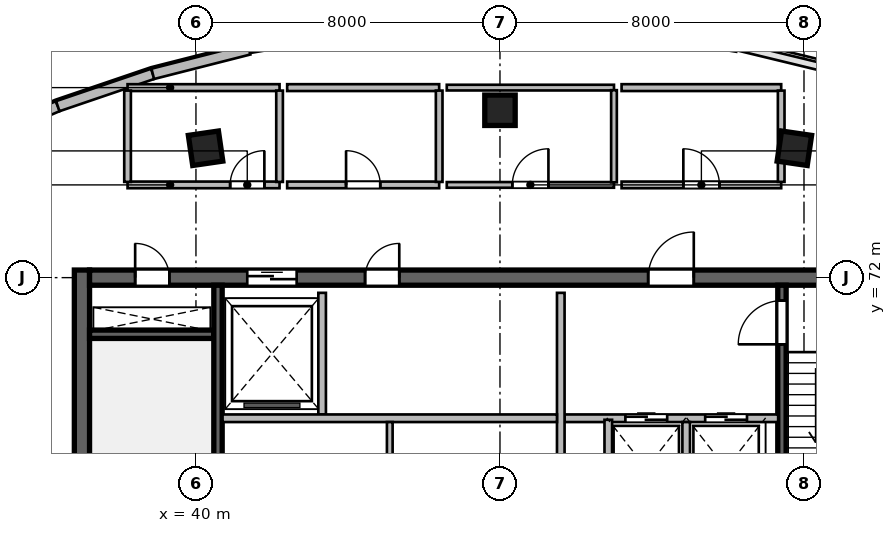
"""IFC4 building model, lengths in metres.
Left out: names, types, materials, properties, quantities, classifications, styles, units other than length and angle.
Written with IfcOpenShell. Run it as: python <this file> out.ifc"""

import sys

from ifc_helpers import new_model, si_unit, direction, frame, frame_2d, origin, origin_2d, place, context, subcontext, project, spatial, rectangle, extrude, source, transform, mapped, element, fill, save


model = new_model("IFC4")
c1 = context("Model", 3, precision=1e-05, world=origin(), true_north=direction((0.0, 1.0)))
c2 = subcontext(c1, "Body", "Model", "MODEL_VIEW")
j1 = project(units=[si_unit("LENGTHUNIT", "METRE"), si_unit("PLANEANGLEUNIT", "RADIAN")], contexts=[c1])
p1 = place(None, origin())
s1 = spatial("IfcSite", under=j1, at=p1, CompositionType="ELEMENT")
p2 = place(p1, origin())
s2 = spatial("IfcBuilding", under=s1, at=p2, CompositionType="ELEMENT")
p3 = place(p2, frame((0.0, 0.0, 279.6)))
s3 = spatial("IfcBuildingStorey", under=s2, at=p3, CompositionType="ELEMENT", Elevation=279.6)
m1 = source(origin(), c2, "Body", "SweptSolid", [
    extrude(rectangle(XDim=12.0, YDim=0.4, at=frame_2d((6.0, 0.0))), origin(), (0.0, 0.0, 1.0), 3.9),
])
p4 = place(p3, frame((37.0, 60.2, 0.0), z_axis=(0.0, 0.0, 1.0), x_axis=(0.0, 1.0, 0.0)))
e1 = element("IfcWall", 1, at=p4, inside=s3, PredefinedType="SHEAR", context=c2, shape_type="MappedRepresentation", body=[
    mapped(m1, transform((0.0, 0.0, 0.0), scale=1.0)),
])
m2 = source(origin(), c2, "Body", "SweptSolid", [
    extrude(rectangle(XDim=21.6, YDim=0.4, at=frame_2d((10.8, 0.0))), origin(), (0.0, 0.0, 1.0), 3.9),
])
p5 = place(p3, frame((37.2, 72.0, 0.0), z_axis=(0.0, 0.0, 1.0), x_axis=(1.0, 0.0, 0.0)))
e2 = element("IfcWall", 2, at=p5, inside=s3, PredefinedType="SHEAR", context=c2, shape_type="MappedRepresentation", body=[
    mapped(m2, transform((0.0, 0.0, 0.0), scale=1.0)),
])
p6 = place(p5, frame((1.2, 0.0, 0.0)))
e3 = element("IfcOpeningElement", 3, at=p6, cuts=e2, PredefinedType="OPENING", context=c2, shape_type="SweptSolid", body=[
    extrude(rectangle(XDim=0.9, YDim=2.1, at=frame_2d((0.45, 1.05))), frame((0.0, 0.21, 0.0), z_axis=(0.0, -1.0, 0.0), x_axis=(1.0, 0.0, 0.0)), (0.0, 0.0, 1.0), 0.42),
])
p7 = place(p5, frame((14.7, 0.0, 0.0)))
e4 = element("IfcOpeningElement", 4, at=p7, cuts=e2, PredefinedType="OPENING", context=c2, shape_type="SweptSolid", body=[
    extrude(rectangle(XDim=1.2, YDim=2.15, at=frame_2d((0.6, 1.075))), frame((0.0, 0.21, 0.0), z_axis=(0.0, -1.0, 0.0), x_axis=(1.0, 0.0, 0.0)), (0.0, 0.0, 1.0), 0.42),
])
p8 = place(p5, frame((4.15, 0.0, 0.0)))
e5 = element("IfcOpeningElement", 5, at=p8, cuts=e2, PredefinedType="OPENING", context=c2, shape_type="SweptSolid", body=[
    extrude(rectangle(XDim=1.3, YDim=2.15, at=frame_2d((0.65, 1.075))), frame((0.0, 0.21, 0.0), z_axis=(0.0, -1.0, 0.0), x_axis=(1.0, 0.0, 0.0)), (0.0, 0.0, 1.0), 0.42),
])
p9 = place(p5, frame((7.25, 0.0, 0.0)))
e6 = element("IfcOpeningElement", 6, at=p9, cuts=e2, PredefinedType="OPENING", context=c2, shape_type="SweptSolid", body=[
    extrude(rectangle(XDim=0.9, YDim=2.1, at=frame_2d((0.45, 1.05))), frame((0.0, 0.21, 0.0), z_axis=(0.0, -1.0, 0.0), x_axis=(1.0, 0.0, 0.0)), (0.0, 0.0, 1.0), 0.42),
])
m3 = source(origin(), c2, "Body", "SweptSolid", [
    extrude(rectangle(XDim=3.27, YDim=0.22, at=frame_2d((1.635, 0.0))), origin(), (0.0, 0.0, 1.0), 3.9),
])
p10 = place(p3, frame((37.2, 70.51, 0.0), z_axis=(0.0, 0.0, 1.0), x_axis=(1.0, 0.0, 0.0)))
e7 = element("IfcWall", 7, at=p10, inside=s3, PredefinedType="SHEAR", context=c2, shape_type="MappedRepresentation", body=[
    mapped(m3, transform((0.0, 0.0, 0.0), scale=1.0)),
])
m4 = source(origin(), c2, "Body", "SweptSolid", [
    extrude(rectangle(XDim=11.2, YDim=0.22, at=frame_2d((5.6, 0.0))), origin(), (0.0, 0.0, 1.0), 3.9),
])
p11 = place(p3, frame((40.58, 60.6, 0.0), z_axis=(0.0, 0.0, 1.0), x_axis=(0.0, 1.0, 0.0)))
e8 = element("IfcWall", 8, at=p11, inside=s3, PredefinedType="SHEAR", context=c2, shape_type="MappedRepresentation", body=[
    mapped(m4, transform((0.0, 0.0, 0.0), scale=1.0)),
])
p12 = place(p3, frame((55.42, 60.6, 0.0), z_axis=(0.0, 0.0, 1.0), x_axis=(0.0, 1.0, 0.0)))
e9 = element("IfcWall", 9, at=p12, inside=s3, PredefinedType="SHEAR", context=c2, shape_type="MappedRepresentation", body=[
    mapped(m4, transform((0.0, 0.0, 0.0), scale=1.0)),
])
p13 = place(p12, frame((9.645, 0.0, 0.0)))
e10 = element("IfcOpeningElement", 10, at=p13, cuts=e9, PredefinedType="OPENING", context=c2, shape_type="SweptSolid", body=[
    extrude(rectangle(XDim=1.15, YDim=2.15, at=frame_2d((0.575, 1.075))), frame((0.0, 0.12, 0.0), z_axis=(0.0, -1.0, 0.0), x_axis=(1.0, 0.0, 0.0)), (0.0, 0.0, 1.0), 0.24),
])
m5 = source(origin(), c2, "Body", "SweptSolid", [
    extrude(rectangle(XDim=0.8, YDim=0.8, at=origin_2d()), origin(), (0.0, 0.0, 1.0), 3.9),
])
for number, where, z_axis, x_axis in (
    (11, (40.253, 75.404, 0.0), (0.0, 0.0, 1.0), (-0.143, 0.99, 0.0)),
    (12, (48.0, 76.404, 0.0), (0.0, 0.0, 1.0), (0.0, 1.0, 0.0)),
    (13, (55.747, 75.404, 0.0), (0.0, 0.0, 1.0), (0.143, 0.99, 0.0)),
):
    element("IfcColumn", number, at=place(p3, frame(where, z_axis=z_axis, x_axis=x_axis)), inside=s3, PredefinedType="COLUMN", context=c2, shape_type="MappedRepresentation", body=[
        mapped(m5, transform((0.0, 0.0, 0.0), scale=1.0)),
    ])
m6 = source(origin(), c2, "Body", "SweptSolid", [
    extrude(rectangle(XDim=2.673, YDim=0.28, at=frame_2d((1.337, 0.0))), origin(), (0.0, 0.0, 1.0), 3.64),
])
p14 = place(p3, frame((33.907, 75.458, 0.0), z_axis=(0.0, 0.0, 1.0), x_axis=(0.919036345912, 0.394172798266, 0.0)))
e14 = element("IfcWall", 14, at=p14, inside=s3, PredefinedType="SOLIDWALL", context=c2, shape_type="MappedRepresentation", body=[
    mapped(m6, transform((0.0, 0.0, 0.0), scale=1.0)),
])
m7 = source(origin(), c2, "Body", "SweptSolid", [
    extrude(rectangle(XDim=2.64, YDim=0.28, at=frame_2d((1.32, 0.0))), origin(), (0.0, 0.0, 1.0), 3.64),
])
p15 = place(p3, frame((36.364, 76.511, 0.0), z_axis=(0.0, 0.0, 1.0), x_axis=(0.946685911962, 0.322158011064, 0.0)))
e15 = element("IfcWall", 15, at=p15, inside=s3, PredefinedType="SOLIDWALL", context=c2, shape_type="MappedRepresentation", body=[
    mapped(m7, transform((0.0, 0.0, 0.0), scale=1.0)),
])
m8 = source(origin(), c2, "Body", "SweptSolid", [
    extrude(rectangle(XDim=2.614, YDim=0.28, at=frame_2d((1.307, 0.0))), origin(), (0.0, 0.0, 1.0), 3.64),
])
p16 = place(p3, frame((38.863, 77.362, 0.0), z_axis=(0.0, 0.0, 1.0), x_axis=(0.969106509315, 0.246642602978, 0.0)))
e16 = element("IfcWall", 16, at=p16, inside=s3, PredefinedType="SOLIDWALL", context=c2, shape_type="MappedRepresentation", body=[
    mapped(m8, transform((0.0, 0.0, 0.0), scale=1.0)),
])
m9 = source(origin(), c2, "Body", "SweptSolid", [
    extrude(rectangle(XDim=5.62, YDim=0.2, at=frame_2d((2.81, 0.0))), origin(), (0.0, 0.0, 1.0), 3.64),
])
p17 = place(p3, frame((49.7, 68.3, 0.0), z_axis=(0.0, 0.0, 1.0), x_axis=(1.0, 0.0, 0.0)))
e17 = element("IfcWall", 17, at=p17, inside=s3, PredefinedType="SOLIDWALL", context=c2, shape_type="MappedRepresentation", body=[
    mapped(m9, transform((0.0, 0.0, 0.0), scale=1.0)),
])
p18 = place(p17, frame((1.6, 0.0, 0.0)))
e18 = element("IfcOpeningElement", 18, at=p18, cuts=e17, PredefinedType="OPENING", context=c2, shape_type="SweptSolid", body=[
    extrude(rectangle(XDim=1.1, YDim=2.15, at=frame_2d((0.55, 1.075))), frame((0.0, 0.11, 0.0), z_axis=(0.0, -1.0, 0.0), x_axis=(1.0, 0.0, 0.0)), (0.0, 0.0, 1.0), 0.22),
])
p19 = place(p17, frame((3.7, 0.0, 0.0)))
e19 = element("IfcOpeningElement", 19, at=p19, cuts=e17, PredefinedType="OPENING", context=c2, shape_type="SweptSolid", body=[
    extrude(rectangle(XDim=1.1, YDim=2.15, at=frame_2d((0.55, 1.075))), frame((0.0, 0.11, 0.0), z_axis=(0.0, -1.0, 0.0), x_axis=(1.0, 0.0, 0.0)), (0.0, 0.0, 1.0), 0.22),
])
m10 = source(origin(), c2, "Body", "SweptSolid", [
    extrude(rectangle(XDim=5.8, YDim=0.2, at=frame_2d((2.9, 0.0))), origin(), (0.0, 0.0, 1.0), 3.64),
])
p20 = place(p3, frame((49.6, 65.8, 0.0), z_axis=(0.0, 0.0, 1.0), x_axis=(0.0, 1.0, 0.0)))
e20 = element("IfcWall", 20, at=p20, inside=s3, PredefinedType="SOLIDWALL", context=c2, shape_type="MappedRepresentation", body=[
    mapped(m10, transform((0.0, 0.0, 0.0), scale=1.0)),
])
m11 = source(origin(), c2, "Body", "SweptSolid", [
    extrude(rectangle(XDim=2.58, YDim=0.2, at=frame_2d((1.29, 0.0))), origin(), (0.0, 0.0, 1.0), 3.64),
])
p21 = place(p3, frame((50.85, 65.68, 0.0), z_axis=(0.0, 0.0, 1.0), x_axis=(0.0, 1.0, 0.0)))
e21 = element("IfcWall", 21, at=p21, inside=s3, PredefinedType="SOLIDWALL", context=c2, shape_type="MappedRepresentation", body=[
    mapped(m11, transform((0.0, 0.0, 0.0), scale=1.0)),
])
m12 = source(origin(), c2, "Body", "SweptSolid", [
    extrude(rectangle(XDim=2.4, YDim=0.2, at=frame_2d((1.2, 0.0))), origin(), (0.0, 0.0, 1.0), 3.64),
])
p22 = place(p3, frame((52.9, 65.8, 0.0), z_axis=(0.0, 0.0, 1.0), x_axis=(0.0, 1.0, 0.0)))
e22 = element("IfcWall", 22, at=p22, inside=s3, PredefinedType="SOLIDWALL", context=c2, shape_type="MappedRepresentation", body=[
    mapped(m12, transform((0.0, 0.0, 0.0), scale=1.0)),
])
m13 = source(origin(), c2, "Body", "SweptSolid", [
    extrude(rectangle(XDim=3.2, YDim=0.2, at=frame_2d((1.6, 0.0))), origin(), (0.0, 0.0, 1.0), 3.64),
])
p23 = place(p3, frame((43.32, 68.4, 0.0), z_axis=(0.0, 0.0, 1.0), x_axis=(0.0, 1.0, 0.0)))
e23 = element("IfcWall", 23, at=p23, inside=s3, PredefinedType="SOLIDWALL", context=c2, shape_type="MappedRepresentation", body=[
    mapped(m13, transform((0.0, 0.0, 0.0), scale=1.0)),
])
m14 = source(origin(), c2, "Body", "SweptSolid", [
    extrude(rectangle(XDim=8.8, YDim=0.2, at=frame_2d((4.4, 0.0))), origin(), (0.0, 0.0, 1.0), 3.64),
])
p24 = place(p3, frame((40.7, 68.3, 0.0), z_axis=(0.0, 0.0, 1.0), x_axis=(1.0, 0.0, 0.0)))
e24 = element("IfcWall", 24, at=p24, inside=s3, PredefinedType="SOLIDWALL", context=c2, shape_type="MappedRepresentation", body=[
    mapped(m14, transform((0.0, 0.0, 0.0), scale=1.0)),
])
m15 = source(origin(), c2, "Body", "SweptSolid", [
    extrude(rectangle(XDim=2.4, YDim=0.15, at=frame_2d((1.2, 0.0))), origin(), (0.0, 0.0, 1.0), 3.64),
])
p25 = place(p3, frame((45.1, 65.8, 0.0), z_axis=(0.0, 0.0, 1.0), x_axis=(0.0, 1.0, 0.0)))
e25 = element("IfcWall", 25, at=p25, inside=s3, PredefinedType="PARTITIONING", context=c2, shape_type="MappedRepresentation", body=[
    mapped(m15, transform((0.0, 0.0, 0.0), scale=1.0)),
])
m16 = source(origin(), c2, "Body", "SweptSolid", [
    extrude(rectangle(XDim=4.0, YDim=0.175, at=frame_2d((2.0, 0.0))), origin(), (0.0, 0.0, 1.0), 3.64),
])
p26 = place(p3, frame((38.2, 74.44, 0.0), z_axis=(0.0, 0.0, 1.0), x_axis=(1.0, 0.0, 0.0)))
e26 = element("IfcWall", 26, at=p26, inside=s3, PredefinedType="PARTITIONING", context=c2, shape_type="MappedRepresentation", body=[
    mapped(m16, transform((0.0, 0.0, 0.0), scale=1.0)),
])
p27 = place(p26, frame((2.7, 0.0, 0.0)))
e27 = element("IfcOpeningElement", 27, at=p27, cuts=e26, PredefinedType="OPENING", context=c2, shape_type="SweptSolid", body=[
    extrude(rectangle(XDim=0.9, YDim=2.08, at=frame_2d((0.45, 1.04))), frame((0.0, 0.098, 0.0), z_axis=(0.0, -1.0, 0.0), x_axis=(1.0, 0.0, 0.0)), (0.0, 0.0, 1.0), 0.195),
])
m17 = source(origin(), c2, "Body", "SweptSolid", [
    extrude(rectangle(XDim=4.0, YDim=0.18, at=frame_2d((2.0, 0.0))), origin(), (0.0, 0.0, 1.0), 3.64),
])
p28 = place(p3, frame((38.2, 77.0, 0.0), z_axis=(0.0, 0.0, 1.0), x_axis=(1.0, 0.0, 0.0)))
e28 = element("IfcWall", 28, at=p28, inside=s3, PredefinedType="PLUMBINGWALL", context=c2, shape_type="MappedRepresentation", body=[
    mapped(m17, transform((0.0, 0.0, 0.0), scale=1.0)),
])
m18 = source(origin(), c2, "Body", "SweptSolid", [
    extrude(rectangle(XDim=2.403, YDim=0.175, at=frame_2d((1.201, 0.0))), origin(), (0.0, 0.0, 1.0), 3.64),
])
for number, where, z_axis, x_axis in (
    (29, (38.2, 74.519, 0.0), (0.0, 0.0, 1.0), (0.0, 1.0, 0.0)),
    (30, (42.2, 74.519, 0.0), (0.0, 0.0, 1.0), (0.0, 1.0, 0.0)),
):
    element("IfcWall", number, at=place(p3, frame(where, z_axis=z_axis, x_axis=x_axis)), inside=s3, PredefinedType="PARTITIONING", context=c2, shape_type="MappedRepresentation", body=[
        mapped(m18, transform((0.0, 0.0, 0.0), scale=1.0)),
    ])
p29 = place(p3, frame((42.4, 74.44, 0.0), z_axis=(0.0, 0.0, 1.0), x_axis=(1.0, 0.0, 0.0)))
e31 = element("IfcWall", 31, at=p29, inside=s3, PredefinedType="PARTITIONING", context=c2, shape_type="MappedRepresentation", body=[
    mapped(m16, transform((0.0, 0.0, 0.0), scale=1.0)),
])
p30 = place(p29, frame((1.55, 0.0, 0.0)))
e32 = element("IfcOpeningElement", 32, at=p30, cuts=e31, PredefinedType="OPENING", context=c2, shape_type="SweptSolid", body=[
    extrude(rectangle(XDim=0.9, YDim=2.08, at=frame_2d((0.45, 1.04))), frame((0.0, 0.098, 0.0), z_axis=(0.0, -1.0, 0.0), x_axis=(1.0, 0.0, 0.0)), (0.0, 0.0, 1.0), 0.195),
])
p31 = place(p3, frame((42.4, 77.0, 0.0), z_axis=(0.0, 0.0, 1.0), x_axis=(1.0, 0.0, 0.0)))
e33 = element("IfcWall", 33, at=p31, inside=s3, PredefinedType="PLUMBINGWALL", context=c2, shape_type="MappedRepresentation", body=[
    mapped(m17, transform((0.0, 0.0, 0.0), scale=1.0)),
])
p32 = place(p3, frame((46.4, 74.519, 0.0), z_axis=(0.0, 0.0, 1.0), x_axis=(0.0, 1.0, 0.0)))
e34 = element("IfcWall", 34, at=p32, inside=s3, PredefinedType="PARTITIONING", context=c2, shape_type="MappedRepresentation", body=[
    mapped(m18, transform((0.0, 0.0, 0.0), scale=1.0)),
])
m19 = source(origin(), c2, "Body", "SweptSolid", [
    extrude(rectangle(XDim=4.4, YDim=0.15, at=frame_2d((2.2, 0.0))), origin(), (0.0, 0.0, 1.0), 3.64),
])
p33 = place(p3, frame((46.6, 74.44, 0.0), z_axis=(0.0, 0.0, 1.0), x_axis=(1.0, 0.0, 0.0)))
e35 = element("IfcWall", 35, at=p33, inside=s3, PredefinedType="PARTITIONING", context=c2, shape_type="MappedRepresentation", body=[
    mapped(m19, transform((0.0, 0.0, 0.0), scale=1.0)),
])
p34 = place(p33, frame((1.725, 0.0, 0.0)))
e36 = element("IfcOpeningElement", 36, at=p34, cuts=e35, PredefinedType="OPENING", context=c2, shape_type="SweptSolid", body=[
    extrude(rectangle(XDim=0.95, YDim=2.1, at=frame_2d((0.475, 1.05))), frame((0.0, 0.085, 0.0), z_axis=(0.0, -1.0, 0.0), x_axis=(1.0, 0.0, 0.0)), (0.0, 0.0, 1.0), 0.17),
])
p35 = place(p3, frame((46.6, 77.0, 0.0), z_axis=(0.0, 0.0, 1.0), x_axis=(1.0, 0.0, 0.0)))
e37 = element("IfcWall", 37, at=p35, inside=s3, PredefinedType="PARTITIONING", context=c2, shape_type="MappedRepresentation", body=[
    mapped(m19, transform((0.0, 0.0, 0.0), scale=1.0)),
])
m20 = source(origin(), c2, "Body", "SweptSolid", [
    extrude(rectangle(XDim=2.425, YDim=0.15, at=frame_2d((1.212, 0.0))), origin(), (0.0, 0.0, 1.0), 3.64),
])
p36 = place(p3, frame((51.0, 74.508, 0.0), z_axis=(0.0, 0.0, 1.0), x_axis=(0.0, 1.0, 0.0)))
e38 = element("IfcWall", 38, at=p36, inside=s3, PredefinedType="PARTITIONING", context=c2, shape_type="MappedRepresentation", body=[
    mapped(m20, transform((0.0, 0.0, 0.0), scale=1.0)),
])
m21 = source(origin(), c2, "Body", "SweptSolid", [
    extrude(rectangle(XDim=4.2, YDim=0.175, at=frame_2d((2.1, 0.0))), origin(), (0.0, 0.0, 1.0), 3.64),
])
p37 = place(p3, frame((51.2, 74.44, 0.0), z_axis=(0.0, 0.0, 1.0), x_axis=(1.0, 0.0, 0.0)))
e39 = element("IfcWall", 39, at=p37, inside=s3, PredefinedType="PARTITIONING", context=c2, shape_type="MappedRepresentation", body=[
    mapped(m21, transform((0.0, 0.0, 0.0), scale=1.0)),
])
p38 = place(p37, frame((1.625, 0.0, 0.0)))
e40 = element("IfcOpeningElement", 40, at=p38, cuts=e39, PredefinedType="OPENING", context=c2, shape_type="SweptSolid", body=[
    extrude(rectangle(XDim=0.95, YDim=2.12, at=frame_2d((0.475, 1.06))), frame((0.0, 0.098, 0.0), z_axis=(0.0, -1.0, 0.0), x_axis=(1.0, 0.0, 0.0)), (0.0, 0.0, 1.0), 0.195),
])
m22 = source(origin(), c2, "Body", "SweptSolid", [
    extrude(rectangle(XDim=4.2, YDim=0.18, at=frame_2d((2.1, 0.0))), origin(), (0.0, 0.0, 1.0), 3.64),
])
p39 = place(p3, frame((51.2, 77.0, 0.0), z_axis=(0.0, 0.0, 1.0), x_axis=(1.0, 0.0, 0.0)))
e41 = element("IfcWall", 41, at=p39, inside=s3, PredefinedType="PLUMBINGWALL", context=c2, shape_type="MappedRepresentation", body=[
    mapped(m22, transform((0.0, 0.0, 0.0), scale=1.0)),
])
p40 = place(p3, frame((55.4, 74.519, 0.0), z_axis=(0.0, 0.0, 1.0), x_axis=(0.0, 1.0, 0.0)))
e42 = element("IfcWall", 42, at=p40, inside=s3, PredefinedType="PARTITIONING", context=c2, shape_type="MappedRepresentation", body=[
    mapped(m18, transform((0.0, 0.0, 0.0), scale=1.0)),
])
m23 = source(origin(), c2, "Body", "SweptSolid", [
    extrude(rectangle(XDim=12.311, YDim=0.195, at=frame_2d((6.155, 0.0))), origin(), (0.0, 0.0, 1.0), 3.64),
])
p41 = place(p3, frame((36.5, 63.216, 0.0), z_axis=(0.0, 0.0, 1.0), x_axis=(-0.268759602651, 0.963207286093, 0.0)))
e43 = element("IfcWall", 43, at=p41, inside=s3, PredefinedType="PARTITIONING", context=c2, shape_type="MappedRepresentation", body=[
    mapped(m23, transform((0.0, 0.0, 0.0), scale=1.0)),
])
m24 = source(origin(), c2, "Body", "SweptSolid", [
    extrude(rectangle(XDim=0.9, YDim=2.1, at=frame_2d((0.45, 1.05))), frame((0.0, 0.025, 0.0), z_axis=(0.0, -1.0, 0.0), x_axis=(1.0, 0.0, 0.0)), (0.0, 0.0, 1.0), 0.05),
])
p42 = place(p6, origin())
e44 = element("IfcDoor", 44, at=p42, inside=s3, OperationType="SINGLE_SWING_LEFT", PredefinedType="DOOR", context=c2, shape_type="MappedRepresentation", body=[
    mapped(m24, transform((0.0, 0.0, 0.0), scale=1.0)),
])
fill(e3, e44)
m25 = source(origin(), c2, "Body", "SweptSolid", [
    extrude(rectangle(XDim=1.15, YDim=2.15, at=frame_2d((0.575, 1.075))), frame((0.0, 0.025, 0.0), z_axis=(0.0, -1.0, 0.0), x_axis=(1.0, 0.0, 0.0)), (0.0, 0.0, 1.0), 0.05),
])
p43 = place(p13, origin())
e45 = element("IfcDoor", 45, at=p43, inside=s3, OperationType="SINGLE_SWING_LEFT", PredefinedType="DOOR", context=c2, shape_type="MappedRepresentation", body=[
    mapped(m25, transform((0.0, 0.0, 0.0), scale=1.0)),
])
fill(e10, e45)
m26 = source(origin(), c2, "Body", "SweptSolid", [
    extrude(rectangle(XDim=1.2, YDim=2.15, at=frame_2d((0.6, 1.075))), frame((0.0, 0.025, 0.0), z_axis=(0.0, -1.0, 0.0), x_axis=(1.0, 0.0, 0.0)), (0.0, 0.0, 1.0), 0.05),
])
p44 = place(p7, origin())
e46 = element("IfcDoor", 46, at=p44, inside=s3, OperationType="SINGLE_SWING_RIGHT", PredefinedType="DOOR", context=c2, shape_type="MappedRepresentation", body=[
    mapped(m26, transform((0.0, 0.0, 0.0), scale=1.0)),
])
fill(e4, e46)
m27 = source(origin(), c2, "Body", "SweptSolid", [
    extrude(rectangle(XDim=1.1, YDim=2.15, at=frame_2d((0.55, 1.075))), frame((0.0, 0.025, 0.0), z_axis=(0.0, -1.0, 0.0), x_axis=(1.0, 0.0, 0.0)), (0.0, 0.0, 1.0), 0.05),
])
p45 = place(p18, origin())
e47 = element("IfcDoor", 47, at=p45, inside=s3, OperationType="DOUBLE_DOOR_SLIDING", PredefinedType="DOOR", context=c2, shape_type="MappedRepresentation", body=[
    mapped(m27, transform((0.0, 0.0, 0.0), scale=1.0)),
])
fill(e18, e47)
p46 = place(p19, origin())
e48 = element("IfcDoor", 48, at=p46, inside=s3, OperationType="DOUBLE_DOOR_SLIDING", PredefinedType="DOOR", context=c2, shape_type="MappedRepresentation", body=[
    mapped(m27, transform((0.0, 0.0, 0.0), scale=1.0)),
])
fill(e19, e48)
m28 = source(origin(), c2, "Body", "SweptSolid", [
    extrude(rectangle(XDim=1.3, YDim=2.15, at=frame_2d((0.65, 1.075))), frame((0.0, 0.025, 0.0), z_axis=(0.0, -1.0, 0.0), x_axis=(1.0, 0.0, 0.0)), (0.0, 0.0, 1.0), 0.05),
])
p47 = place(p8, origin())
e49 = element("IfcDoor", 49, at=p47, inside=s3, OperationType="DOUBLE_DOOR_SLIDING", PredefinedType="DOOR", context=c2, shape_type="MappedRepresentation", body=[
    mapped(m28, transform((0.0, 0.0, 0.0), scale=1.0)),
])
fill(e5, e49)
p48 = place(p9, origin())
e50 = element("IfcDoor", 50, at=p48, inside=s3, OperationType="SINGLE_SWING_RIGHT", PredefinedType="DOOR", context=c2, shape_type="MappedRepresentation", body=[
    mapped(m24, transform((0.0, 0.0, 0.0), scale=1.0)),
])
fill(e6, e50)
m29 = source(origin(), c2, "Body", "SweptSolid", [
    extrude(rectangle(XDim=0.9, YDim=2.08, at=frame_2d((0.45, 1.04))), frame((0.0, 0.025, 0.0), z_axis=(0.0, -1.0, 0.0), x_axis=(1.0, 0.0, 0.0)), (0.0, 0.0, 1.0), 0.05),
])
p49 = place(p27, origin())
e51 = element("IfcDoor", 51, at=p49, inside=s3, OperationType="SINGLE_SWING_RIGHT", PredefinedType="DOOR", context=c2, shape_type="MappedRepresentation", body=[
    mapped(m29, transform((0.0, 0.0, 0.0), scale=1.0)),
])
fill(e27, e51)
p50 = place(p30, origin())
e52 = element("IfcDoor", 52, at=p50, inside=s3, OperationType="SINGLE_SWING_LEFT", PredefinedType="DOOR", context=c2, shape_type="MappedRepresentation", body=[
    mapped(m29, transform((0.0, 0.0, 0.0), scale=1.0)),
])
fill(e32, e52)
m30 = source(origin(), c2, "Body", "SweptSolid", [
    extrude(rectangle(XDim=0.95, YDim=2.1, at=frame_2d((0.475, 1.05))), frame((0.0, 0.025, 0.0), z_axis=(0.0, -1.0, 0.0), x_axis=(1.0, 0.0, 0.0)), (0.0, 0.0, 1.0), 0.05),
])
p51 = place(p34, origin())
e53 = element("IfcDoor", 53, at=p51, inside=s3, OperationType="SINGLE_SWING_RIGHT", PredefinedType="DOOR", context=c2, shape_type="MappedRepresentation", body=[
    mapped(m30, transform((0.0, 0.0, 0.0), scale=1.0)),
])
fill(e36, e53)
m31 = source(origin(), c2, "Body", "SweptSolid", [
    extrude(rectangle(XDim=0.95, YDim=2.12, at=frame_2d((0.475, 1.06))), frame((0.0, 0.025, 0.0), z_axis=(0.0, -1.0, 0.0), x_axis=(1.0, 0.0, 0.0)), (0.0, 0.0, 1.0), 0.05),
])
p52 = place(p38, origin())
e54 = element("IfcDoor", 54, at=p52, inside=s3, OperationType="SINGLE_SWING_LEFT", PredefinedType="DOOR", context=c2, shape_type="MappedRepresentation", body=[
    mapped(m31, transform((0.0, 0.0, 0.0), scale=1.0)),
])
fill(e40, e54)
save(model, sys.argv[1])
